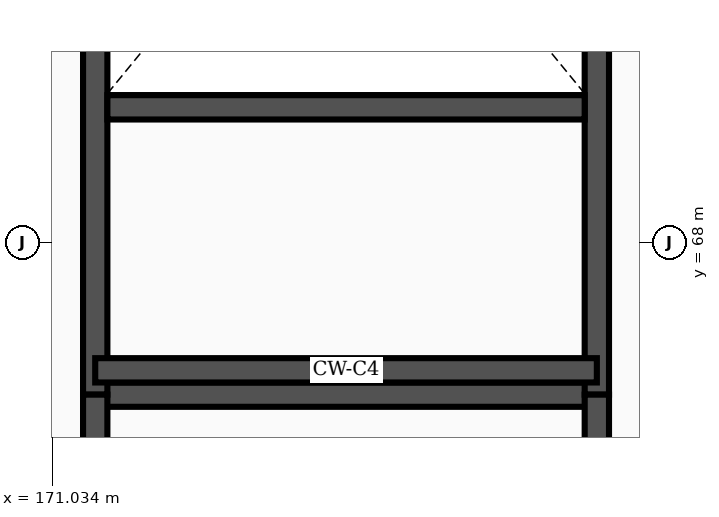
"""IFC4 building model, lengths in metres.
Left out: names, types, materials, properties, quantities, classifications, styles, units other than length and angle.
Written with IfcOpenShell. Run it as: python <this file> out.ifc"""

import sys

from ifc_helpers import new_model, si_unit, direction, frame, frame_2d, origin, place, context, subcontext, project, spatial, rectangle, extrude, element, save


model = new_model("IFC4")
c1 = context("Model", 3, precision=1e-05, world=origin(), true_north=direction((0.0, 1.0)))
c2 = subcontext(c1, "Body", "Model", "MODEL_VIEW")
j1 = project(units=[si_unit("LENGTHUNIT", "METRE"), si_unit("PLANEANGLEUNIT", "RADIAN")], contexts=[c1])
p1 = place(None, origin())
s1 = spatial("IfcSite", under=j1, at=p1, CompositionType="ELEMENT")
p2 = place(p1, origin())
s2 = spatial("IfcBuilding", under=s1, at=p2, CompositionType="ELEMENT")
p3 = place(p2, frame((0.0, 0.0, 6.0)))
s3 = spatial("IfcBuildingStorey", under=s2, at=p3, CompositionType="ELEMENT", Elevation=6.0)
p4 = place(p3, frame((171.6, 66.0, 0.0), z_axis=(0.0, 0.0, 1.0), x_axis=(1.0, 0.0, 0.0)))
e1 = element("IfcWall", 1, at=p4, inside=s3, PredefinedType="SHEAR", context=c2, shape_type="SweptSolid", body=[
    extrude(rectangle(XDim=6.6, YDim=0.32, at=frame_2d((3.3, 0.0))), origin(), (0.0, 0.0, 1.0), 5.15),
])
p5 = place(p3, frame((171.6, 66.0, 0.0), z_axis=(0.0, 0.0, 1.0), x_axis=(0.0, 1.0, 0.0)))
e2 = element("IfcWall", 2, at=p5, inside=s3, PredefinedType="SHEAR", context=c2, shape_type="SweptSolid", body=[
    extrude(rectangle(XDim=14.6, YDim=0.32, at=frame_2d((7.3, 0.0))), origin(), (0.0, 0.0, 1.0), 5.15),
])
p6 = place(p3, frame((178.2, 66.0, 0.0), z_axis=(0.0, 0.0, 1.0), x_axis=(0.0, 1.0, 0.0)))
e3 = element("IfcWall", 3, at=p6, inside=s3, PredefinedType="SHEAR", context=c2, shape_type="SweptSolid", body=[
    extrude(rectangle(XDim=14.6, YDim=0.32, at=frame_2d((7.3, 0.0))), origin(), (0.0, 0.0, 1.0), 5.15),
])
p7 = place(p6, frame((11.65, 0.0, 0.0)))
e4 = element("IfcOpeningElement", 4, at=p7, cuts=e3, PredefinedType="OPENING", context=c2, shape_type="SweptSolid", body=[
    extrude(rectangle(XDim=2.4, YDim=2.25, at=frame_2d((1.2, 1.125))), frame((0.0, 0.172, 0.0), z_axis=(0.0, -1.0, 0.0), x_axis=(1.0, 0.0, 0.0)), (0.0, 0.0, 1.0), 0.344),
])
p8 = place(p3, frame((171.76, 69.78, 0.0), z_axis=(0.0, 0.0, 1.0), x_axis=(1.0, 0.0, 0.0)))
e5 = element("IfcWall", 5, at=p8, inside=s3, PredefinedType="SHEAR", context=c2, shape_type="SweptSolid", body=[
    extrude(rectangle(XDim=6.28, YDim=0.32, at=frame_2d((3.14, 0.0))), origin(), (0.0, 0.0, 1.0), 5.15),
])
p9 = place(p3, frame((171.6, 66.32, 0.0), z_axis=(0.0, 0.0, 1.0), x_axis=(1.0, 0.0, 0.0)))
e6 = element("IfcWall", 6, at=p9, inside=s3, PredefinedType="SHEAR", context=c2, shape_type="SweptSolid", body=[
    extrude(rectangle(XDim=6.6, YDim=0.32, at=frame_2d((3.3, 0.0))), origin(), (0.0, 0.0, 1.0), 5.15),
])
p10 = place(p3, frame((171.6, 54.0, 0.0), z_axis=(0.0, 0.0, 1.0), x_axis=(0.0, 1.0, 0.0)))
e7 = element("IfcWall", 7, at=p10, inside=s3, PredefinedType="SHEAR", context=c2, shape_type="SweptSolid", body=[
    extrude(rectangle(XDim=12.0, YDim=0.32, at=frame_2d((6.0, 0.0))), origin(), (0.0, 0.0, 1.0), 5.15),
])
p11 = place(p3, frame((178.2, 54.0, 0.0), z_axis=(0.0, 0.0, 1.0), x_axis=(0.0, 1.0, 0.0)))
e8 = element("IfcWall", 8, at=p11, inside=s3, PredefinedType="SHEAR", context=c2, shape_type="SweptSolid", body=[
    extrude(rectangle(XDim=12.0, YDim=0.32, at=frame_2d((6.0, 0.0))), origin(), (0.0, 0.0, 1.0), 5.15),
])
p12 = place(p11, frame((0.55, 0.0, 0.0)))
e9 = element("IfcOpeningElement", 9, at=p12, cuts=e8, PredefinedType="OPENING", context=c2, shape_type="SweptSolid", body=[
    extrude(rectangle(XDim=2.4, YDim=2.25, at=frame_2d((1.2, 1.125))), frame((0.0, 0.172, 0.0), z_axis=(0.0, -1.0, 0.0), x_axis=(1.0, 0.0, 0.0)), (0.0, 0.0, 1.0), 0.344),
])
save(model, sys.argv[1])
